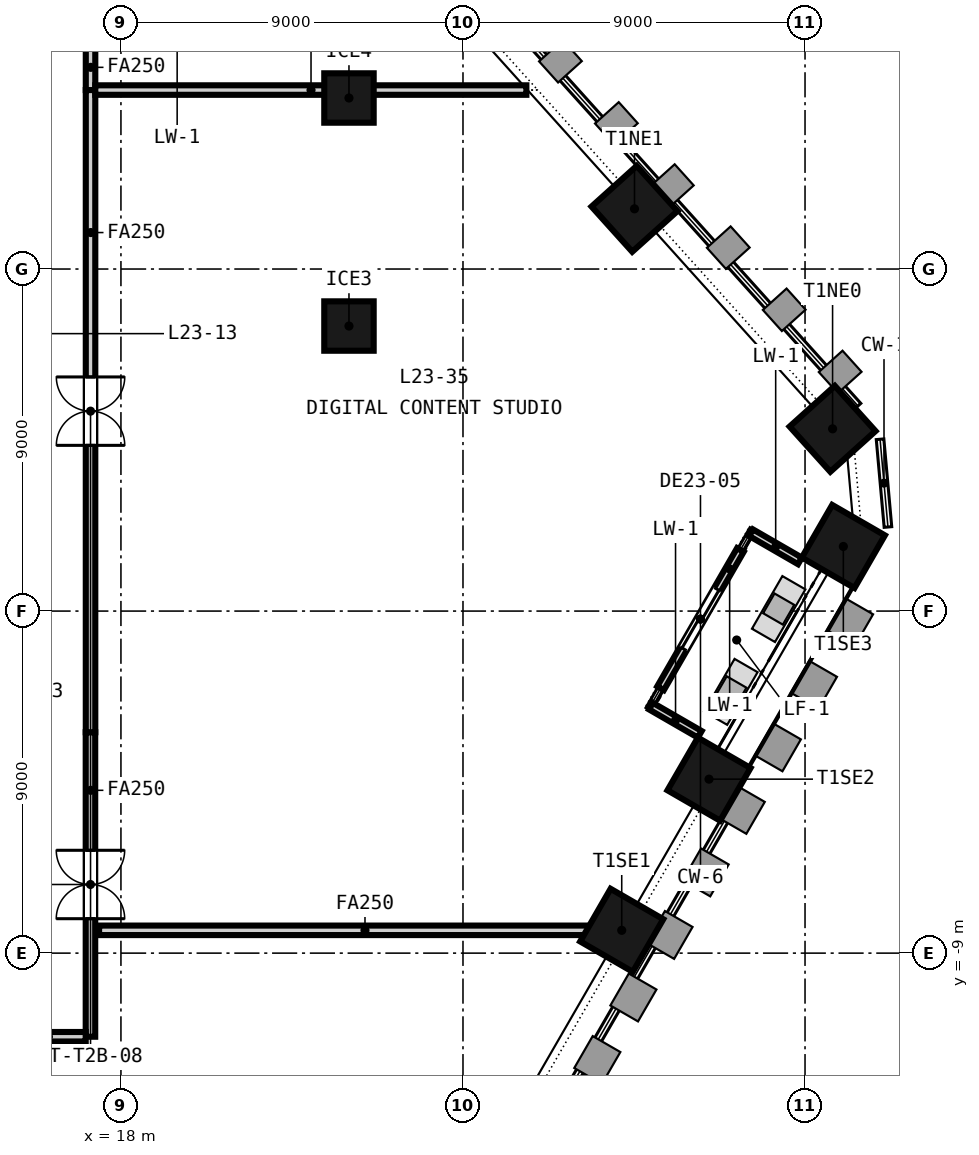
"""IFC4 building model, lengths in metres.
Left out: names, types, materials, properties, quantities, classifications, styles, units other than length and angle.
Written with IfcOpenShell. Run it as: python <this file> out.ifc"""

import sys

from ifc_helpers import new_model, si_unit, direction, frame, frame_2d, origin, origin_2d, place, context, subcontext, project, spatial, rectangle, extrude, element, fill, save


model = new_model("IFC4")
c1 = context("Model", 3, precision=1e-05, world=origin(), true_north=direction((0.0, 1.0)))
c2 = subcontext(c1, "Body", "Model", "MODEL_VIEW")
j1 = project(units=[si_unit("LENGTHUNIT", "METRE"), si_unit("PLANEANGLEUNIT", "RADIAN")], contexts=[c1])
p1 = place(None, origin())
s1 = spatial("IfcSite", under=j1, at=p1, CompositionType="ELEMENT")
p2 = place(p1, origin())
s2 = spatial("IfcBuilding", under=s1, at=p2, CompositionType="ELEMENT")
p3 = place(p2, frame((0.0, 0.0, 98.9)))
s3 = spatial("IfcBuildingStorey", under=s2, at=p3, CompositionType="ELEMENT", Elevation=98.9)
for number, where, z_axis, x_axis in (
    (1, (31.177, -8.4, -0.15), (0.0, 0.0, 1.0), (0.5, 0.866, 0.0)),
    (2, (33.473, -4.422, -0.15), (0.0, 0.0, 1.0), (0.5, 0.866, 0.0)),
    (3, (37.008, 1.7, -0.15), (0.0, 0.0, 1.0), (0.5, 0.866, 0.0)),
    (4, (36.725, 4.795, -0.15), (0.0, 0.0, 1.0), (-0.669, 0.743, 0.0)),
    (5, (31.513, 10.584, -0.15), (0.0, 0.0, 1.0), (-0.669, 0.743, 0.0)),
):
    element("IfcColumn", number, at=place(p3, frame(where, z_axis=z_axis, x_axis=x_axis)), inside=s3, PredefinedType="COLUMN", context=c2, shape_type="SweptSolid", body=[
        extrude(rectangle(XDim=1.6, YDim=1.6, at=origin_2d()), origin(), (0.0, 0.0, 1.0), 3.65),
    ])
for number, where, z_axis, x_axis in (
    (6, (24.0, 7.5, -0.15), (0.0, 0.0, 1.0), (1.0, 0.0, 0.0)),
    (7, (24.0, 13.5, -0.15), (0.0, 0.0, 1.0), (1.0, 0.0, 0.0)),
):
    element("IfcColumn", number, at=place(p3, frame(where, z_axis=z_axis, x_axis=x_axis)), inside=s3, PredefinedType="COLUMN", context=c2, shape_type="SweptSolid", body=[
        extrude(rectangle(XDim=1.3, YDim=1.3, at=origin_2d()), origin(), (0.0, 0.0, 1.0), 3.65),
    ])
p4 = place(p3, frame((32.199, -2.03, 0.0), z_axis=(0.0, 0.0, 1.0), x_axis=(0.499958946799, 0.866049104564, 0.0)))
e8 = element("IfcWall", 8, at=p4, inside=s3, PredefinedType="SOLIDWALL", context=c2, shape_type="SweptSolid", body=[
    extrude(rectangle(XDim=4.2, YDim=0.2, at=frame_2d((2.1, 0.0))), origin(), (0.0, 0.0, 1.0), 2.821),
])
p5 = place(p4, frame((1.2, 0.0, 0.0)))
e9 = element("IfcOpeningElement", 9, at=p5, cuts=e8, PredefinedType="OPENING", context=c2, shape_type="SweptSolid", body=[
    extrude(rectangle(XDim=1.8, YDim=2.4, at=frame_2d((0.9, 1.2))), frame((0.0, 0.11, 0.0), z_axis=(0.0, -1.0, 0.0), x_axis=(1.0, 0.0, 0.0)), (0.0, 0.0, 1.0), 0.22),
])
for number, where, z_axis, x_axis in (
    (10, (33.23, -3.243, 0.0), (0.0, 0.0, 1.0), (-0.866, 0.5, 0.0)),
    (11, (35.865, 1.321, 0.0), (0.0, 0.0, 1.0), (-0.866, 0.5, 0.0)),
):
    element("IfcWall", number, at=place(p3, frame(where, z_axis=z_axis, x_axis=x_axis)), inside=s3, PredefinedType="SOLIDWALL", context=c2, shape_type="SweptSolid", body=[
        extrude(rectangle(XDim=1.484, YDim=0.2, at=frame_2d((0.742, 0.0))), origin(), (0.0, 0.0, 1.0), 3.05),
    ])
p6 = place(p3, frame((17.2, 18.0, 0.0), z_axis=(0.0, 0.0, 1.0), x_axis=(0.0, -1.0, 0.0)))
e12 = element("IfcWall", 12, at=p6, inside=s3, PredefinedType="PARTITIONING", context=c2, shape_type="SweptSolid", body=[
    extrude(rectangle(XDim=4.291, YDim=0.25, at=frame_2d((2.146, 0.0))), origin(), (0.0, 0.0, 1.0), 2.741),
])
p7 = place(p6, frame((1.246, 0.0, 0.0)))
e13 = element("IfcOpeningElement", 13, at=p7, cuts=e12, PredefinedType="OPENING", context=c2, shape_type="SweptSolid", body=[
    extrude(rectangle(XDim=1.8, YDim=2.1, at=frame_2d((0.9, 1.05))), frame((0.0, 0.135, 0.0), z_axis=(0.0, -1.0, 0.0), x_axis=(1.0, 0.0, 0.0)), (0.0, 0.0, 1.0), 0.27),
])
p8 = place(p3, frame((17.198, -3.188, 0.0), z_axis=(0.0, 0.0, 1.0), x_axis=(0.0, -1.0, 0.0)))
e14 = element("IfcWall", 14, at=p8, inside=s3, PredefinedType="PARTITIONING", context=c2, shape_type="SweptSolid", body=[
    extrude(rectangle(XDim=8.012, YDim=0.25, at=frame_2d((4.006, 0.0))), origin(), (0.0, 0.0, 1.0), 2.741),
])
p9 = place(p8, frame((3.106, 0.0, 0.0)))
e15 = element("IfcOpeningElement", 15, at=p9, cuts=e14, PredefinedType="OPENING", context=c2, shape_type="SweptSolid", body=[
    extrude(rectangle(XDim=1.8, YDim=2.1, at=frame_2d((0.9, 1.05))), frame((0.0, 0.135, 0.0), z_axis=(0.0, -1.0, 0.0), x_axis=(1.0, 0.0, 0.0)), (0.0, 0.0, 1.0), 0.27),
])
p10 = place(p3, frame((17.2, 13.709, 0.0), z_axis=(0.0, 0.0, 1.0), x_axis=(0.0, -1.0, 0.0)))
e16 = element("IfcWall", 16, at=p10, inside=s3, PredefinedType="PARTITIONING", context=c2, shape_type="SweptSolid", body=[
    extrude(rectangle(XDim=16.897, YDim=0.25, at=frame_2d((8.448, 0.0))), origin(), (0.0, 0.0, 1.0), 2.741),
])
p11 = place(p10, frame((7.549, 0.0, 0.0)))
e17 = element("IfcOpeningElement", 17, at=p11, cuts=e16, PredefinedType="OPENING", context=c2, shape_type="SweptSolid", body=[
    extrude(rectangle(XDim=1.8, YDim=2.1, at=frame_2d((0.9, 1.05))), frame((0.0, 0.135, 0.0), z_axis=(0.0, -1.0, 0.0), x_axis=(1.0, 0.0, 0.0)), (0.0, 0.0, 1.0), 0.27),
])
p12 = place(p3, frame((17.073, -11.2, 0.0), z_axis=(0.0, 0.0, 1.0), x_axis=(-1.0, 0.0, 0.0)))
e18 = element("IfcWall", 18, at=p12, inside=s3, PredefinedType="PARTITIONING", context=c2, shape_type="SweptSolid", body=[
    extrude(rectangle(XDim=1.973, YDim=0.25, at=frame_2d((0.986, 0.0))), origin(), (0.0, 0.0, 1.0), 2.741),
])
p13 = place(p3, frame((17.325, 13.709, 0.0), z_axis=(0.0, 0.0, 1.0), x_axis=(1.0, 0.0, 0.0)))
e19 = element("IfcWall", 19, at=p13, inside=s3, PredefinedType="PARTITIONING", context=c2, shape_type="SweptSolid", body=[
    extrude(rectangle(XDim=11.343, YDim=0.25, at=frame_2d((5.671, 0.0))), origin(), (0.0, 0.0, 1.0), 2.741),
])
p14 = place(p3, frame((17.425, -8.4, 0.0), z_axis=(0.0, 0.0, 1.0), x_axis=(1.0, 0.0, 0.0)))
e20 = element("IfcWall", 20, at=p14, inside=s3, PredefinedType="PARTITIONING", context=c2, shape_type="SweptSolid", body=[
    extrude(rectangle(XDim=13.983, YDim=0.25, at=frame_2d((6.991, 0.0))), origin(), (0.0, 0.0, 1.0), 2.741),
])
p15 = place(p5, origin())
e21 = element("IfcDoor", 21, at=p15, inside=s3, OperationType="SINGLE_SWING_LEFT", PredefinedType="DOOR", context=c2, shape_type="SweptSolid", body=[
    extrude(rectangle(XDim=1.8, YDim=2.4, at=frame_2d((0.9, 1.2))), frame((0.0, 0.025, 0.0), z_axis=(0.0, -1.0, 0.0), x_axis=(1.0, 0.0, 0.0)), (0.0, 0.0, 1.0), 0.05),
])
fill(e9, e21)
p16 = place(p11, origin())
e22 = element("IfcDoor", 22, at=p16, inside=s3, OperationType="DOUBLE_DOOR_DOUBLE_SWING", PredefinedType="DOOR", context=c2, shape_type="SweptSolid", body=[
    extrude(rectangle(XDim=1.8, YDim=2.1, at=frame_2d((0.9, 1.05))), frame((0.0, 0.025, 0.0), z_axis=(0.0, -1.0, 0.0), x_axis=(1.0, 0.0, 0.0)), (0.0, 0.0, 1.0), 0.05),
])
fill(e17, e22)
p17 = place(p9, origin())
e23 = element("IfcDoor", 23, at=p17, inside=s3, OperationType="DOUBLE_DOOR_DOUBLE_SWING", PredefinedType="DOOR", context=c2, shape_type="SweptSolid", body=[
    extrude(rectangle(XDim=1.8, YDim=2.1, at=frame_2d((0.9, 1.05))), frame((0.0, 0.025, 0.0), z_axis=(0.0, -1.0, 0.0), x_axis=(1.0, 0.0, 0.0)), (0.0, 0.0, 1.0), 0.05),
])
fill(e15, e23)
save(model, sys.argv[1])
